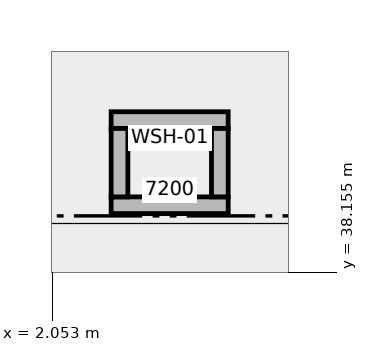
"""IFC4 building model, lengths in metres.
Left out: names, types, materials, properties, quantities, classifications, styles, units other than length and angle.
Written with IfcOpenShell. Run it as: python <this file> out.ifc"""

import sys

from ifc_helpers import new_model, si_unit, direction, frame, frame_2d, origin, place, context, subcontext, project, spatial, rectangle, extrude, element, save


model = new_model("IFC4")
c1 = context("Model", 3, precision=1e-05, world=origin(), true_north=direction((0.0, 1.0)))
c2 = subcontext(c1, "Body", "Model", "MODEL_VIEW")
j1 = project(units=[si_unit("LENGTHUNIT", "METRE"), si_unit("PLANEANGLEUNIT", "RADIAN")], contexts=[c1])
p1 = place(None, origin())
s1 = spatial("IfcSite", under=j1, at=p1, CompositionType="ELEMENT")
p2 = place(p1, origin())
s2 = spatial("IfcBuilding", under=s1, at=p2, CompositionType="ELEMENT")
p3 = place(p2, frame((0.0, 0.0, -4.5)))
s3 = spatial("IfcBuildingStorey", under=s2, at=p3, CompositionType="ELEMENT", Elevation=-4.5)
for number, where, z_axis, x_axis in (
    (1, (2.83, 39.04, 0.0), (0.0, 0.0, 1.0), (1.0, 0.0, 0.0)),
    (2, (2.83, 40.16, 0.0), (0.0, 0.0, 1.0), (1.0, 0.0, 0.0)),
):
    element("IfcWall", number, at=place(p3, frame(where, z_axis=z_axis, x_axis=x_axis)), inside=s3, PredefinedType="STANDARD", context=c2, shape_type="SweptSolid", body=[
        extrude(rectangle(XDim=1.54, YDim=0.22, at=frame_2d((0.77, 0.0))), origin(), (0.0, 0.0, 1.0), 3.19),
    ])
for number, where, z_axis, x_axis in (
    (3, (2.94, 39.15, 0.0), (0.0, 0.0, 1.0), (0.0, 1.0, 0.0)),
    (4, (4.26, 39.15, 0.0), (0.0, 0.0, 1.0), (0.0, 1.0, 0.0)),
):
    element("IfcWall", number, at=place(p3, frame(where, z_axis=z_axis, x_axis=x_axis)), inside=s3, PredefinedType="STANDARD", context=c2, shape_type="SweptSolid", body=[
        extrude(rectangle(XDim=0.9, YDim=0.22, at=frame_2d((0.45, 0.0))), origin(), (0.0, 0.0, 1.0), 3.19),
    ])
save(model, sys.argv[1])
